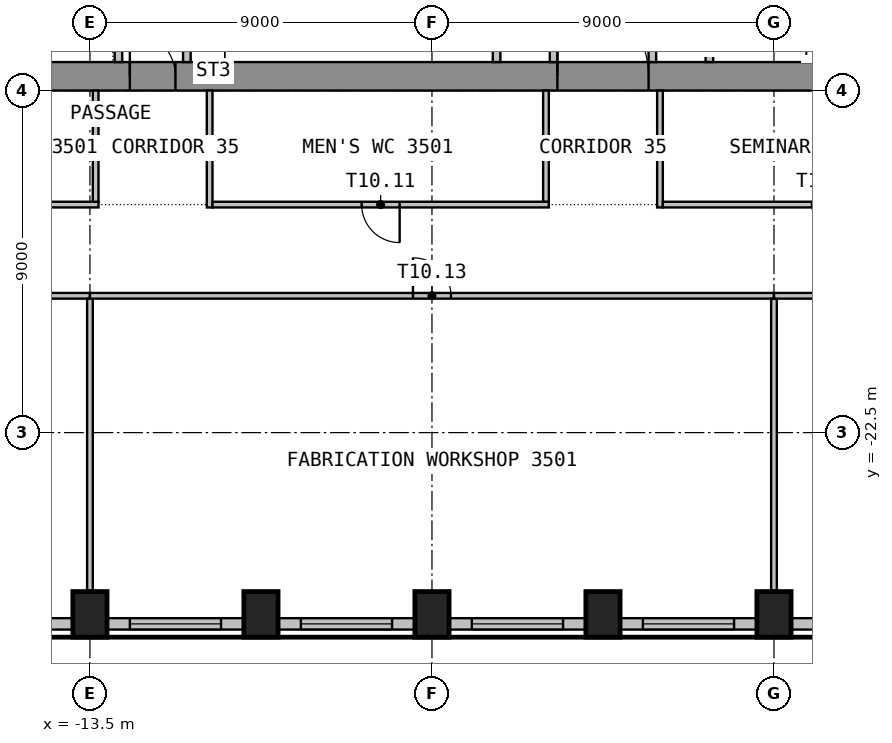
"""IFC4 building model, lengths in metres.
Left out: names, types, materials, properties, quantities, classifications, styles, units other than length and angle.
Written with IfcOpenShell. Run it as: python <this file> out.ifc"""

import sys

from ifc_helpers import new_model, si_unit, direction, frame, frame_2d, origin, origin_2d, place, context, subcontext, project, spatial, rectangle, extrude, element, fill, save


model = new_model("IFC4")
c1 = context("Model", 3, precision=1e-05, world=origin(), true_north=direction((0.0, 1.0)))
c2 = subcontext(c1, "Body", "Model", "MODEL_VIEW")
j1 = project(units=[si_unit("LENGTHUNIT", "METRE"), si_unit("PLANEANGLEUNIT", "RADIAN")], contexts=[c1])
p1 = place(None, origin())
s1 = spatial("IfcSite", under=j1, at=p1, CompositionType="ELEMENT")
p2 = place(p1, origin())
s2 = spatial("IfcBuilding", under=s1, at=p2, CompositionType="ELEMENT")
p3 = place(p2, frame((0.0, 0.0, 144.3)))
s3 = spatial("IfcBuildingStorey", under=s2, at=p3, CompositionType="ELEMENT", Elevation=144.3)
for number, where, z_axis, x_axis in (
    (1, (-13.5, -27.283, 0.0), (0.0, 0.0, 1.0), (1.0, 0.0, 0.0)),
    (2, (-9.0, -27.283, 0.0), (0.0, 0.0, 1.0), (1.0, 0.0, 0.0)),
    (3, (-4.5, -27.283, 0.0), (0.0, 0.0, 1.0), (1.0, 0.0, 0.0)),
    (4, (0.0, -27.283, 0.0), (0.0, 0.0, 1.0), (1.0, 0.0, 0.0)),
    (5, (4.5, -27.283, 0.0), (0.0, 0.0, 1.0), (1.0, 0.0, 0.0)),
):
    element("IfcColumn", number, at=place(p3, frame(where, z_axis=z_axis, x_axis=x_axis)), inside=s3, PredefinedType="COLUMN", context=c2, shape_type="SweptSolid", body=[
        extrude(rectangle(XDim=0.9, YDim=1.2, at=origin_2d()), origin(), (0.0, 0.0, 1.0), 3.575),
    ])
p4 = place(p3, frame((-17.245, -27.533, 0.0), z_axis=(0.0, 0.0, 1.0), x_axis=(1.0, 0.0, 0.0)))
e6 = element("IfcWall", 6, at=p4, inside=s3, PredefinedType="SOLIDWALL", context=c2, shape_type="SweptSolid", body=[
    extrude(rectangle(XDim=3.294, YDim=0.3, at=frame_2d((1.647, 0.0))), origin(), (0.0, 0.0, 1.0), 3.575),
])
p5 = place(p4, frame((0.295, 0.0, 0.9)))
e7 = element("IfcOpeningElement", 7, at=p5, cuts=e6, PredefinedType="OPENING", context=c2, shape_type="SweptSolid", body=[
    extrude(rectangle(XDim=2.4, YDim=2.1, at=frame_2d((1.2, 1.05))), frame((0.0, 0.16, 0.0), z_axis=(0.0, -1.0, 0.0), x_axis=(1.0, 0.0, 0.0)), (0.0, 0.0, 1.0), 0.32),
])
p6 = place(p3, frame((-13.05, -27.533, 0.0), z_axis=(0.0, 0.0, 1.0), x_axis=(1.0, 0.0, 0.0)))
e8 = element("IfcWall", 8, at=p6, inside=s3, PredefinedType="SOLIDWALL", context=c2, shape_type="SweptSolid", body=[
    extrude(rectangle(XDim=3.599, YDim=0.3, at=frame_2d((1.8, 0.0))), origin(), (0.0, 0.0, 1.0), 3.575),
])
p7 = place(p6, frame((0.6, 0.0, 0.9)))
e9 = element("IfcOpeningElement", 9, at=p7, cuts=e8, PredefinedType="OPENING", context=c2, shape_type="SweptSolid", body=[
    extrude(rectangle(XDim=2.4, YDim=2.1, at=frame_2d((1.2, 1.05))), frame((0.0, 0.16, 0.0), z_axis=(0.0, -1.0, 0.0), x_axis=(1.0, 0.0, 0.0)), (0.0, 0.0, 1.0), 0.32),
])
p8 = place(p3, frame((-8.55, -27.533, 0.0), z_axis=(0.0, 0.0, 1.0), x_axis=(1.0, 0.0, 0.0)))
e10 = element("IfcWall", 10, at=p8, inside=s3, PredefinedType="SOLIDWALL", context=c2, shape_type="SweptSolid", body=[
    extrude(rectangle(XDim=3.599, YDim=0.3, at=frame_2d((1.8, 0.0))), origin(), (0.0, 0.0, 1.0), 3.575),
])
p9 = place(p8, frame((0.6, 0.0, 0.9)))
e11 = element("IfcOpeningElement", 11, at=p9, cuts=e10, PredefinedType="OPENING", context=c2, shape_type="SweptSolid", body=[
    extrude(rectangle(XDim=2.4, YDim=2.1, at=frame_2d((1.2, 1.05))), frame((0.0, 0.16, 0.0), z_axis=(0.0, -1.0, 0.0), x_axis=(1.0, 0.0, 0.0)), (0.0, 0.0, 1.0), 0.32),
])
p10 = place(p3, frame((-4.05, -27.533, 0.0), z_axis=(0.0, 0.0, 1.0), x_axis=(1.0, 0.0, 0.0)))
e12 = element("IfcWall", 12, at=p10, inside=s3, PredefinedType="SOLIDWALL", context=c2, shape_type="SweptSolid", body=[
    extrude(rectangle(XDim=3.599, YDim=0.3, at=frame_2d((1.8, 0.0))), origin(), (0.0, 0.0, 1.0), 3.575),
])
p11 = place(p10, frame((0.6, 0.0, 0.9)))
e13 = element("IfcOpeningElement", 13, at=p11, cuts=e12, PredefinedType="OPENING", context=c2, shape_type="SweptSolid", body=[
    extrude(rectangle(XDim=2.4, YDim=2.1, at=frame_2d((1.2, 1.05))), frame((0.0, 0.16, 0.0), z_axis=(0.0, -1.0, 0.0), x_axis=(1.0, 0.0, 0.0)), (0.0, 0.0, 1.0), 0.32),
])
p12 = place(p3, frame((0.45, -27.533, 0.0), z_axis=(0.0, 0.0, 1.0), x_axis=(1.0, 0.0, 0.0)))
e14 = element("IfcWall", 14, at=p12, inside=s3, PredefinedType="SOLIDWALL", context=c2, shape_type="SweptSolid", body=[
    extrude(rectangle(XDim=3.599, YDim=0.3, at=frame_2d((1.8, 0.0))), origin(), (0.0, 0.0, 1.0), 3.575),
])
p13 = place(p12, frame((0.6, 0.0, 0.9)))
e15 = element("IfcOpeningElement", 15, at=p13, cuts=e14, PredefinedType="OPENING", context=c2, shape_type="SweptSolid", body=[
    extrude(rectangle(XDim=2.4, YDim=2.1, at=frame_2d((1.2, 1.05))), frame((0.0, 0.16, 0.0), z_axis=(0.0, -1.0, 0.0), x_axis=(1.0, 0.0, 0.0)), (0.0, 0.0, 1.0), 0.32),
])
p14 = place(p3, frame((4.95, -27.533, 0.0), z_axis=(0.0, 0.0, 1.0), x_axis=(1.0, 0.0, 0.0)))
e16 = element("IfcWall", 16, at=p14, inside=s3, PredefinedType="SOLIDWALL", context=c2, shape_type="SweptSolid", body=[
    extrude(rectangle(XDim=3.599, YDim=0.3, at=frame_2d((1.8, 0.0))), origin(), (0.0, 0.0, 1.0), 3.575),
])
p15 = place(p14, frame((0.6, 0.0, 0.9)))
e17 = element("IfcOpeningElement", 17, at=p15, cuts=e16, PredefinedType="OPENING", context=c2, shape_type="SweptSolid", body=[
    extrude(rectangle(XDim=2.4, YDim=2.1, at=frame_2d((1.2, 1.05))), frame((0.0, 0.16, 0.0), z_axis=(0.0, -1.0, 0.0), x_axis=(1.0, 0.0, 0.0)), (0.0, 0.0, 1.0), 0.32),
])
p16 = place(p3, frame((-15.75, -13.125, 0.0), z_axis=(0.0, 0.0, 1.0), x_axis=(1.0, 0.0, 0.0)))
e18 = element("IfcWall", 18, at=p16, inside=s3, PredefinedType="SHEAR", context=c2, shape_type="SweptSolid", body=[
    extrude(rectangle(XDim=31.5, YDim=0.75, at=frame_2d((15.75, 0.0))), origin(), (0.0, 0.0, 1.0), 3.575),
])
p17 = place(p16, frame((14.55, 0.0, 0.0)))
e19 = element("IfcOpeningElement", 19, at=p17, cuts=e18, PredefinedType="OPENING", context=c2, shape_type="SweptSolid", body=[
    extrude(rectangle(XDim=2.4, YDim=2.1, at=frame_2d((1.2, 1.05))), frame((0.0, 0.385, 0.0), z_axis=(0.0, -1.0, 0.0), x_axis=(1.0, 0.0, 0.0)), (0.0, 0.0, 1.0), 0.77),
])
p18 = place(p16, frame((3.3, 0.0, 0.0)))
e20 = element("IfcOpeningElement", 20, at=p18, cuts=e18, PredefinedType="OPENING", context=c2, shape_type="SweptSolid", body=[
    extrude(rectangle(XDim=1.2, YDim=2.1, at=frame_2d((0.6, 1.05))), frame((0.0, 0.385, 0.0), z_axis=(0.0, -1.0, 0.0), x_axis=(1.0, 0.0, 0.0)), (0.0, 0.0, 1.0), 0.77),
])
p19 = place(p16, frame((27.0, 0.0, 0.0)))
e21 = element("IfcOpeningElement", 21, at=p19, cuts=e18, PredefinedType="OPENING", context=c2, shape_type="SweptSolid", body=[
    extrude(rectangle(XDim=1.2, YDim=2.1, at=frame_2d((0.6, 1.05))), frame((0.0, 0.385, 0.0), z_axis=(0.0, -1.0, 0.0), x_axis=(1.0, 0.0, 0.0)), (0.0, 0.0, 1.0), 0.77),
])
p20 = place(p3, frame((-1.3, -12.75, 0.0), z_axis=(0.0, 0.0, 1.0), x_axis=(0.0, 1.0, 0.0)))
e22 = element("IfcWall", 22, at=p20, inside=s3, PredefinedType="PARTITIONING", context=c2, shape_type="SweptSolid", body=[
    extrude(rectangle(XDim=5.6, YDim=0.2, at=frame_2d((2.8, 0.0))), origin(), (0.0, 0.0, 1.0), 3.575),
])
p21 = place(p20, frame((2.25, 0.0, 0.0)))
e23 = element("IfcOpeningElement", 23, at=p21, cuts=e22, PredefinedType="OPENING", context=c2, shape_type="SweptSolid", body=[
    extrude(rectangle(XDim=0.9, YDim=2.1, at=frame_2d((0.45, 1.05))), frame((0.0, 0.11, 0.0), z_axis=(0.0, -1.0, 0.0), x_axis=(1.0, 0.0, 0.0)), (0.0, 0.0, 1.0), 0.22),
])
p22 = place(p3, frame((1.3, -12.75, 0.0), z_axis=(0.0, 0.0, 1.0), x_axis=(0.0, 1.0, 0.0)))
e24 = element("IfcWall", 24, at=p22, inside=s3, PredefinedType="PARTITIONING", context=c2, shape_type="SweptSolid", body=[
    extrude(rectangle(XDim=5.6, YDim=0.2, at=frame_2d((2.8, 0.0))), origin(), (0.0, 0.0, 1.0), 3.575),
])
p23 = place(p22, frame((0.441, 0.0, 0.0)))
e25 = element("IfcOpeningElement", 25, at=p23, cuts=e24, PredefinedType="OPENING", context=c2, shape_type="SweptSolid", body=[
    extrude(rectangle(XDim=0.9, YDim=2.1, at=frame_2d((0.45, 1.05))), frame((0.0, 0.11, 0.0), z_axis=(0.0, -1.0, 0.0), x_axis=(1.0, 0.0, 0.0)), (0.0, 0.0, 1.0), 0.22),
])
p24 = place(p22, frame((2.223, 0.0, 0.0)))
e26 = element("IfcOpeningElement", 26, at=p24, cuts=e24, PredefinedType="OPENING", context=c2, shape_type="SweptSolid", body=[
    extrude(rectangle(XDim=0.9, YDim=2.1, at=frame_2d((0.45, 1.05))), frame((0.0, 0.11, 0.0), z_axis=(0.0, -1.0, 0.0), x_axis=(1.0, 0.0, 0.0)), (0.0, 0.0, 1.0), 0.22),
])
p25 = place(p22, frame((4.032, 0.0, 0.0)))
e27 = element("IfcOpeningElement", 27, at=p25, cuts=e24, PredefinedType="OPENING", context=c2, shape_type="SweptSolid", body=[
    extrude(rectangle(XDim=0.9, YDim=2.1, at=frame_2d((0.45, 1.05))), frame((0.0, 0.11, 0.0), z_axis=(0.0, -1.0, 0.0), x_axis=(1.0, 0.0, 0.0)), (0.0, 0.0, 1.0), 0.22),
])
p26 = place(p3, frame((-12.75, -12.75, 0.0), z_axis=(0.0, 0.0, 1.0), x_axis=(0.0, 1.0, 0.0)))
e28 = element("IfcWall", 28, at=p26, inside=s3, PredefinedType="PARTITIONING", context=c2, shape_type="SweptSolid", body=[
    extrude(rectangle(XDim=1.85, YDim=0.2, at=frame_2d((0.925, 0.0))), origin(), (0.0, 0.0, 1.0), 3.575),
])
p27 = place(p3, frame((-10.95, -12.75, 0.0), z_axis=(0.0, 0.0, 1.0), x_axis=(0.0, 1.0, 0.0)))
e29 = element("IfcWall", 29, at=p27, inside=s3, PredefinedType="PARTITIONING", context=c2, shape_type="SweptSolid", body=[
    extrude(rectangle(XDim=1.85, YDim=0.2, at=frame_2d((0.925, 0.0))), origin(), (0.0, 0.0, 1.0), 3.575),
])
p28 = place(p27, frame((0.475, 0.0, 0.0)))
e30 = element("IfcOpeningElement", 30, at=p28, cuts=e29, PredefinedType="OPENING", context=c2, shape_type="SweptSolid", body=[
    extrude(rectangle(XDim=0.9, YDim=2.1, at=frame_2d((0.45, 1.05))), frame((0.0, 0.11, 0.0), z_axis=(0.0, -1.0, 0.0), x_axis=(1.0, 0.0, 0.0)), (0.0, 0.0, 1.0), 0.22),
])
p29 = place(p3, frame((-19.236, -18.9, 0.0), z_axis=(0.0, 0.0, 1.0), x_axis=(1.0, 0.0, 0.0)))
e31 = element("IfcWall", 31, at=p29, inside=s3, PredefinedType="PARTITIONING", context=c2, shape_type="SweptSolid", body=[
    extrude(rectangle(XDim=5.736, YDim=0.15, at=frame_2d((2.868, 0.0))), origin(), (0.0, 0.0, 1.0), 3.575),
])
p30 = place(p29, frame((2.368, 0.0, 0.0)))
e32 = element("IfcOpeningElement", 32, at=p30, cuts=e31, PredefinedType="OPENING", context=c2, shape_type="SweptSolid", body=[
    extrude(rectangle(XDim=1.0, YDim=2.1, at=frame_2d((0.5, 1.05))), frame((0.0, 0.085, 0.0), z_axis=(0.0, -1.0, 0.0), x_axis=(1.0, 0.0, 0.0)), (0.0, 0.0, 1.0), 0.17),
])
p31 = place(p3, frame((-13.275, -16.5, 0.0), z_axis=(0.0, 0.0, 1.0), x_axis=(-1.0, 0.0, 0.0)))
e33 = element("IfcWall", 33, at=p31, inside=s3, PredefinedType="PARTITIONING", context=c2, shape_type="SweptSolid", body=[
    extrude(rectangle(XDim=5.4, YDim=0.15, at=frame_2d((2.7, 0.0))), origin(), (0.0, 0.0, 1.0), 3.575),
])
p32 = place(p31, frame((2.2, 0.0, 0.0)))
e34 = element("IfcOpeningElement", 34, at=p32, cuts=e33, PredefinedType="OPENING", context=c2, shape_type="SweptSolid", body=[
    extrude(rectangle(XDim=1.0, YDim=2.1, at=frame_2d((0.5, 1.05))), frame((0.0, 0.085, 0.0), z_axis=(0.0, -1.0, 0.0), x_axis=(1.0, 0.0, 0.0)), (0.0, 0.0, 1.0), 0.17),
])
p33 = place(p3, frame((-13.5, -18.975, 0.0), z_axis=(0.0, 0.0, 1.0), x_axis=(0.0, -1.0, 0.0)))
e35 = element("IfcWall", 35, at=p33, inside=s3, PredefinedType="PARTITIONING", context=c2, shape_type="SweptSolid", body=[
    extrude(rectangle(XDim=7.688, YDim=0.15, at=frame_2d((3.844, 0.0))), origin(), (0.0, 0.0, 1.0), 3.575),
])
p34 = place(p3, frame((-13.5, -18.9, 0.0), z_axis=(0.0, 0.0, 1.0), x_axis=(1.0, 0.0, 0.0)))
e36 = element("IfcWall", 36, at=p34, inside=s3, PredefinedType="PARTITIONING", context=c2, shape_type="SweptSolid", body=[
    extrude(rectangle(XDim=18.0, YDim=0.15, at=frame_2d((9.0, 0.0))), origin(), (0.0, 0.0, 1.0), 3.575),
])
p35 = place(p34, frame((8.5, 0.0, 0.0)))
e37 = element("IfcOpeningElement", 37, at=p35, cuts=e36, PredefinedType="OPENING", context=c2, shape_type="SweptSolid", body=[
    extrude(rectangle(XDim=1.0, YDim=2.1, at=frame_2d((0.5, 1.05))), frame((0.0, 0.085, 0.0), z_axis=(0.0, -1.0, 0.0), x_axis=(1.0, 0.0, 0.0)), (0.0, 0.0, 1.0), 0.17),
])
p36 = place(p3, frame((-13.35, -13.5, 0.0), z_axis=(0.0, 0.0, 1.0), x_axis=(0.0, -1.0, 0.0)))
e38 = element("IfcWall", 38, at=p36, inside=s3, PredefinedType="PARTITIONING", context=c2, shape_type="SweptSolid", body=[
    extrude(rectangle(XDim=2.925, YDim=0.15, at=frame_2d((1.462, 0.0))), origin(), (0.0, 0.0, 1.0), 3.575),
])
p37 = place(p3, frame((-10.35, -16.575, 0.0), z_axis=(0.0, 0.0, 1.0), x_axis=(0.0, 1.0, 0.0)))
e39 = element("IfcWall", 39, at=p37, inside=s3, PredefinedType="PARTITIONING", context=c2, shape_type="SweptSolid", body=[
    extrude(rectangle(XDim=3.075, YDim=0.15, at=frame_2d((1.538, 0.0))), origin(), (0.0, 0.0, 1.0), 3.575),
])
p38 = place(p3, frame((-1.425, -16.5, 0.0), z_axis=(0.0, 0.0, 1.0), x_axis=(-1.0, 0.0, 0.0)))
e40 = element("IfcWall", 40, at=p38, inside=s3, PredefinedType="PARTITIONING", context=c2, shape_type="SweptSolid", body=[
    extrude(rectangle(XDim=8.85, YDim=0.15, at=frame_2d((4.425, 0.0))), origin(), (0.0, 0.0, 1.0), 3.575),
])
p39 = place(p38, frame((3.925, 0.0, 0.0)))
e41 = element("IfcOpeningElement", 41, at=p39, cuts=e40, PredefinedType="OPENING", context=c2, shape_type="SweptSolid", body=[
    extrude(rectangle(XDim=1.0, YDim=2.1, at=frame_2d((0.5, 1.05))), frame((0.0, 0.085, 0.0), z_axis=(0.0, -1.0, 0.0), x_axis=(1.0, 0.0, 0.0)), (0.0, 0.0, 1.0), 0.17),
])
p40 = place(p3, frame((-1.5, -13.5, 0.0), z_axis=(0.0, 0.0, 1.0), x_axis=(0.0, -1.0, 0.0)))
e42 = element("IfcWall", 42, at=p40, inside=s3, PredefinedType="PARTITIONING", context=c2, shape_type="SweptSolid", body=[
    extrude(rectangle(XDim=2.925, YDim=0.15, at=frame_2d((1.462, 0.0))), origin(), (0.0, 0.0, 1.0), 3.575),
])
p41 = place(p3, frame((1.5, -16.575, 0.0), z_axis=(0.0, 0.0, 1.0), x_axis=(0.0, 1.0, 0.0)))
e43 = element("IfcWall", 43, at=p41, inside=s3, PredefinedType="PARTITIONING", context=c2, shape_type="SweptSolid", body=[
    extrude(rectangle(XDim=3.075, YDim=0.15, at=frame_2d((1.538, 0.0))), origin(), (0.0, 0.0, 1.0), 3.575),
])
p42 = place(p3, frame((10.425, -16.5, 0.0), z_axis=(0.0, 0.0, 1.0), x_axis=(-1.0, 0.0, 0.0)))
e44 = element("IfcWall", 44, at=p42, inside=s3, PredefinedType="PARTITIONING", context=c2, shape_type="SweptSolid", body=[
    extrude(rectangle(XDim=8.85, YDim=0.15, at=frame_2d((4.425, 0.0))), origin(), (0.0, 0.0, 1.0), 3.575),
])
p43 = place(p42, frame((3.925, 0.0, 0.0)))
e45 = element("IfcOpeningElement", 45, at=p43, cuts=e44, PredefinedType="OPENING", context=c2, shape_type="SweptSolid", body=[
    extrude(rectangle(XDim=1.0, YDim=2.1, at=frame_2d((0.5, 1.05))), frame((0.0, 0.085, 0.0), z_axis=(0.0, -1.0, 0.0), x_axis=(1.0, 0.0, 0.0)), (0.0, 0.0, 1.0), 0.17),
])
p44 = place(p3, frame((4.5, -18.975, 0.0), z_axis=(0.0, 0.0, 1.0), x_axis=(0.0, -1.0, 0.0)))
e46 = element("IfcWall", 46, at=p44, inside=s3, PredefinedType="PARTITIONING", context=c2, shape_type="SweptSolid", body=[
    extrude(rectangle(XDim=7.688, YDim=0.15, at=frame_2d((3.844, 0.0))), origin(), (0.0, 0.0, 1.0), 3.575),
])
p45 = place(p3, frame((4.5, -18.9, 0.0), z_axis=(0.0, 0.0, 1.0), x_axis=(1.0, 0.0, 0.0)))
e47 = element("IfcWall", 47, at=p45, inside=s3, PredefinedType="PARTITIONING", context=c2, shape_type="SweptSolid", body=[
    extrude(rectangle(XDim=11.093, YDim=0.15, at=frame_2d((5.546, 0.0))), origin(), (0.0, 0.0, 1.0), 3.575),
])
p46 = place(p45, frame((5.046, 0.0, 0.0)))
e48 = element("IfcOpeningElement", 48, at=p46, cuts=e47, PredefinedType="OPENING", context=c2, shape_type="SweptSolid", body=[
    extrude(rectangle(XDim=1.0, YDim=2.1, at=frame_2d((0.5, 1.05))), frame((0.0, 0.085, 0.0), z_axis=(0.0, -1.0, 0.0), x_axis=(1.0, 0.0, 0.0)), (0.0, 0.0, 1.0), 0.17),
])
p47 = place(p3, frame((-2.8, -12.749, 0.0), z_axis=(0.0, 0.0, 1.0), x_axis=(0.0, 1.0, 0.0)))
e49 = element("IfcWall", 49, at=p47, inside=s3, PredefinedType="PARTITIONING", context=c2, shape_type="SweptSolid", body=[
    extrude(rectangle(XDim=1.848, YDim=0.2, at=frame_2d((0.924, 0.0))), origin(), (0.0, 0.0, 1.0), 3.575),
])
p48 = place(p3, frame((2.8, -11.069, 0.0), z_axis=(0.0, 0.0, 1.0), x_axis=(0.0, -1.0, 0.0)))
e50 = element("IfcWall", 50, at=p48, inside=s3, PredefinedType="PARTITIONING", context=c2, shape_type="SweptSolid", body=[
    extrude(rectangle(XDim=1.68, YDim=0.2, at=frame_2d((0.84, 0.0))), origin(), (0.0, 0.0, 1.0), 3.575),
])
p49 = place(p7, origin())
e51 = element("IfcWindow", 51, at=p49, inside=s3, PartitioningType="SINGLE_PANEL", PredefinedType="WINDOW", context=c2, shape_type="SweptSolid", body=[
    extrude(rectangle(XDim=2.4, YDim=2.1, at=frame_2d((1.2, 1.05))), frame((0.0, 0.03, 0.0), z_axis=(0.0, -1.0, 0.0), x_axis=(1.0, 0.0, 0.0)), (0.0, 0.0, 1.0), 0.06),
])
fill(e9, e51)
p50 = place(p9, origin())
e52 = element("IfcWindow", 52, at=p50, inside=s3, PartitioningType="SINGLE_PANEL", PredefinedType="WINDOW", context=c2, shape_type="SweptSolid", body=[
    extrude(rectangle(XDim=2.4, YDim=2.1, at=frame_2d((1.2, 1.05))), frame((0.0, 0.03, 0.0), z_axis=(0.0, -1.0, 0.0), x_axis=(1.0, 0.0, 0.0)), (0.0, 0.0, 1.0), 0.06),
])
fill(e11, e52)
p51 = place(p11, origin())
e53 = element("IfcWindow", 53, at=p51, inside=s3, PartitioningType="SINGLE_PANEL", PredefinedType="WINDOW", context=c2, shape_type="SweptSolid", body=[
    extrude(rectangle(XDim=2.4, YDim=2.1, at=frame_2d((1.2, 1.05))), frame((0.0, 0.03, 0.0), z_axis=(0.0, -1.0, 0.0), x_axis=(1.0, 0.0, 0.0)), (0.0, 0.0, 1.0), 0.06),
])
fill(e13, e53)
p52 = place(p13, origin())
e54 = element("IfcWindow", 54, at=p52, inside=s3, PartitioningType="SINGLE_PANEL", PredefinedType="WINDOW", context=c2, shape_type="SweptSolid", body=[
    extrude(rectangle(XDim=2.4, YDim=2.1, at=frame_2d((1.2, 1.05))), frame((0.0, 0.03, 0.0), z_axis=(0.0, -1.0, 0.0), x_axis=(1.0, 0.0, 0.0)), (0.0, 0.0, 1.0), 0.06),
])
fill(e15, e54)
p53 = place(p17, origin())
e55 = element("IfcDoor", 55, at=p53, inside=s3, OperationType="DOUBLE_DOOR_DOUBLE_SWING", PredefinedType="DOOR", context=c2, shape_type="SweptSolid", body=[
    extrude(rectangle(XDim=2.4, YDim=2.1, at=frame_2d((1.2, 1.05))), frame((0.0, 0.025, 0.0), z_axis=(0.0, -1.0, 0.0), x_axis=(1.0, 0.0, 0.0)), (0.0, 0.0, 1.0), 0.05),
])
fill(e19, e55)
p54 = place(p18, origin())
e56 = element("IfcDoor", 56, at=p54, inside=s3, OperationType="SINGLE_SWING_RIGHT", PredefinedType="DOOR", context=c2, shape_type="SweptSolid", body=[
    extrude(rectangle(XDim=1.2, YDim=2.1, at=frame_2d((0.6, 1.05))), frame((0.0, 0.025, 0.0), z_axis=(0.0, -1.0, 0.0), x_axis=(1.0, 0.0, 0.0)), (0.0, 0.0, 1.0), 0.05),
])
fill(e20, e56)
p55 = place(p39, origin())
e57 = element("IfcDoor", 57, at=p55, inside=s3, OperationType="SINGLE_SWING_RIGHT", PredefinedType="DOOR", context=c2, shape_type="SweptSolid", body=[
    extrude(rectangle(XDim=1.0, YDim=2.1, at=frame_2d((0.5, 1.05))), frame((0.0, 0.025, 0.0), z_axis=(0.0, -1.0, 0.0), x_axis=(1.0, 0.0, 0.0)), (0.0, 0.0, 1.0), 0.05),
])
fill(e41, e57)
p56 = place(p35, origin())
e58 = element("IfcDoor", 58, at=p56, inside=s3, OperationType="SINGLE_SWING_RIGHT", PredefinedType="DOOR", context=c2, shape_type="SweptSolid", body=[
    extrude(rectangle(XDim=1.0, YDim=2.1, at=frame_2d((0.5, 1.05))), frame((0.0, 0.025, 0.0), z_axis=(0.0, -1.0, 0.0), x_axis=(1.0, 0.0, 0.0)), (0.0, 0.0, 1.0), 0.05),
])
fill(e37, e58)
save(model, sys.argv[1])
